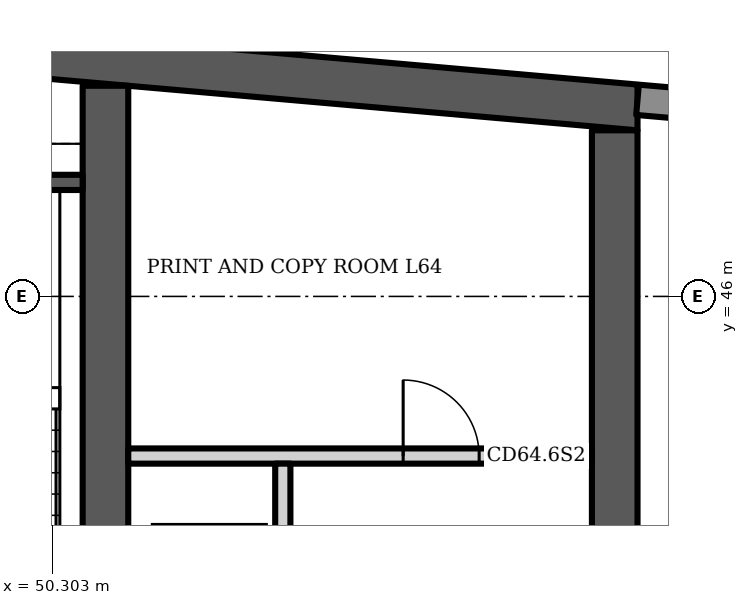
"""IFC4 building model, lengths in metres.
Left out: names, types, materials, properties, quantities, classifications, styles, units other than length and angle.
Written with IfcOpenShell. Run it as: python <this file> out.ifc"""

import sys

from ifc_helpers import new_model, si_unit, direction, frame, frame_2d, origin, place, context, subcontext, project, spatial, polyline, rectangle, outline, extrude, element, fill, save


model = new_model("IFC4")
c1 = context("Model", 3, precision=1e-05, world=origin(), true_north=direction((0.0, 1.0)))
c2 = subcontext(c1, "Body", "Model", "MODEL_VIEW")
j1 = project(units=[si_unit("LENGTHUNIT", "METRE"), si_unit("PLANEANGLEUNIT", "RADIAN")], contexts=[c1])
p1 = place(None, origin())
s1 = spatial("IfcSite", under=j1, at=p1, CompositionType="ELEMENT")
p2 = place(p1, origin())
s2 = spatial("IfcBuilding", under=s1, at=p2, CompositionType="ELEMENT")
p3 = place(p2, frame((0.0, 0.0, 253.9)))
s3 = spatial("IfcBuildingStorey", under=s2, at=p3, CompositionType="ELEMENT", Elevation=253.9)
p4 = place(p3, origin())
e1 = element("IfcWall", 1, at=p4, inside=s3, PredefinedType="SHEAR", context=c2, shape_type="SweptSolid", body=[
    extrude(outline(polyline([(23.0, 48.185), (40.5, 49.716), (58.0, 48.185), (58.0, 48.787), (40.5, 50.318), (23.0, 48.787), (23.0, 48.185)])), origin(), (0.0, 0.0, 1.0), 3.6),
])
p5 = place(p3, frame((51.0, 34.6, 0.0), z_axis=(0.0, 0.0, 1.0), x_axis=(0.0, 1.0, 0.0)))
e2 = element("IfcWall", 2, at=p5, inside=s3, PredefinedType="SHEAR", context=c2, shape_type="SweptSolid", body=[
    extrude(rectangle(XDim=14.171, YDim=0.6, at=frame_2d((7.085, 0.0))), origin(), (0.0, 0.0, 1.0), 3.6),
])
p6 = place(p5, frame((3.8, 0.0, 0.0)))
e3 = element("IfcOpeningElement", 3, at=p6, cuts=e2, PredefinedType="OPENING", context=c2, shape_type="SweptSolid", body=[
    extrude(rectangle(XDim=1.1, YDim=2.1, at=frame_2d((0.55, 1.05))), frame((0.0, 0.31, 0.0), z_axis=(0.0, -1.0, 0.0), x_axis=(1.0, 0.0, 0.0)), (0.0, 0.0, 1.0), 0.62),
])
p7 = place(p3, frame((57.7, 34.6, 0.0), z_axis=(0.0, 0.0, 1.0), x_axis=(0.0, 1.0, 0.0)))
e4 = element("IfcWall", 4, at=p7, inside=s3, PredefinedType="SHEAR", context=c2, shape_type="SweptSolid", body=[
    extrude(rectangle(XDim=13.585, YDim=0.6, at=frame_2d((6.792, 0.0))), origin(), (0.0, 0.0, 1.0), 3.6),
])
p8 = place(p3, frame((60.983, 48.326, 0.0), z_axis=(0.0, 0.0, 1.0), x_axis=(-0.996194, 0.087168, 0.0)))
e5 = element("IfcWall", 5, at=p8, inside=s3, PredefinedType="SOLIDWALL", context=c2, shape_type="SweptSolid", body=[
    extrude(rectangle(XDim=2.994, YDim=0.4, at=frame_2d((1.497, 0.0))), origin(), (0.0, 0.0, 1.0), 3.2),
])
p9 = place(p3, frame((46.75, 47.5, 0.0), z_axis=(0.0, 0.0, 1.0), x_axis=(1.0, 0.0, 0.0)))
e6 = element("IfcWall", 6, at=p9, inside=s3, PredefinedType="SHEAR", context=c2, shape_type="SweptSolid", body=[
    extrude(rectangle(XDim=3.95, YDim=0.2, at=frame_2d((1.975, 0.0))), origin(), (0.0, 0.0, 1.0), 3.2),
])
p10 = place(p3, frame((51.3, 43.9, 0.0), z_axis=(0.0, 0.0, 1.0), x_axis=(1.0, 0.0, 0.0)))
e7 = element("IfcWall", 7, at=p10, inside=s3, PredefinedType="PARTITIONING", context=c2, shape_type="SweptSolid", body=[
    extrude(rectangle(XDim=6.1, YDim=0.2, at=frame_2d((3.05, 0.0))), origin(), (0.0, 0.0, 1.0), 3.2),
])
p11 = place(p10, frame((3.617, 0.0, 0.0)))
e8 = element("IfcOpeningElement", 8, at=p11, cuts=e7, PredefinedType="OPENING", context=c2, shape_type="SweptSolid", body=[
    extrude(rectangle(XDim=1.0, YDim=2.1, at=frame_2d((0.5, 1.05))), frame((0.0, 0.11, 0.0), z_axis=(0.0, -1.0, 0.0), x_axis=(1.0, 0.0, 0.0)), (0.0, 0.0, 1.0), 0.22),
])
p12 = place(p3, origin())
e9 = element("IfcWall", 9, at=p12, inside=s3, PredefinedType="PARTITIONING", context=c2, shape_type="SweptSolid", body=[
    extrude(outline(polyline([(53.433, 40.8), (53.433, 43.8), (53.233, 43.8), (53.233, 40.8), (53.433, 40.8)])), origin(), (0.0, 0.0, 1.0), 3.2),
])
p13 = place(p11, origin())
e10 = element("IfcDoor", 10, at=p13, inside=s3, OperationType="SINGLE_SWING_LEFT", PredefinedType="DOOR", context=c2, shape_type="SweptSolid", body=[
    extrude(rectangle(XDim=1.0, YDim=2.1, at=frame_2d((0.5, 1.05))), frame((0.0, 0.025, 0.0), z_axis=(0.0, -1.0, 0.0), x_axis=(1.0, 0.0, 0.0)), (0.0, 0.0, 1.0), 0.05),
])
fill(e8, e10)
save(model, sys.argv[1])
